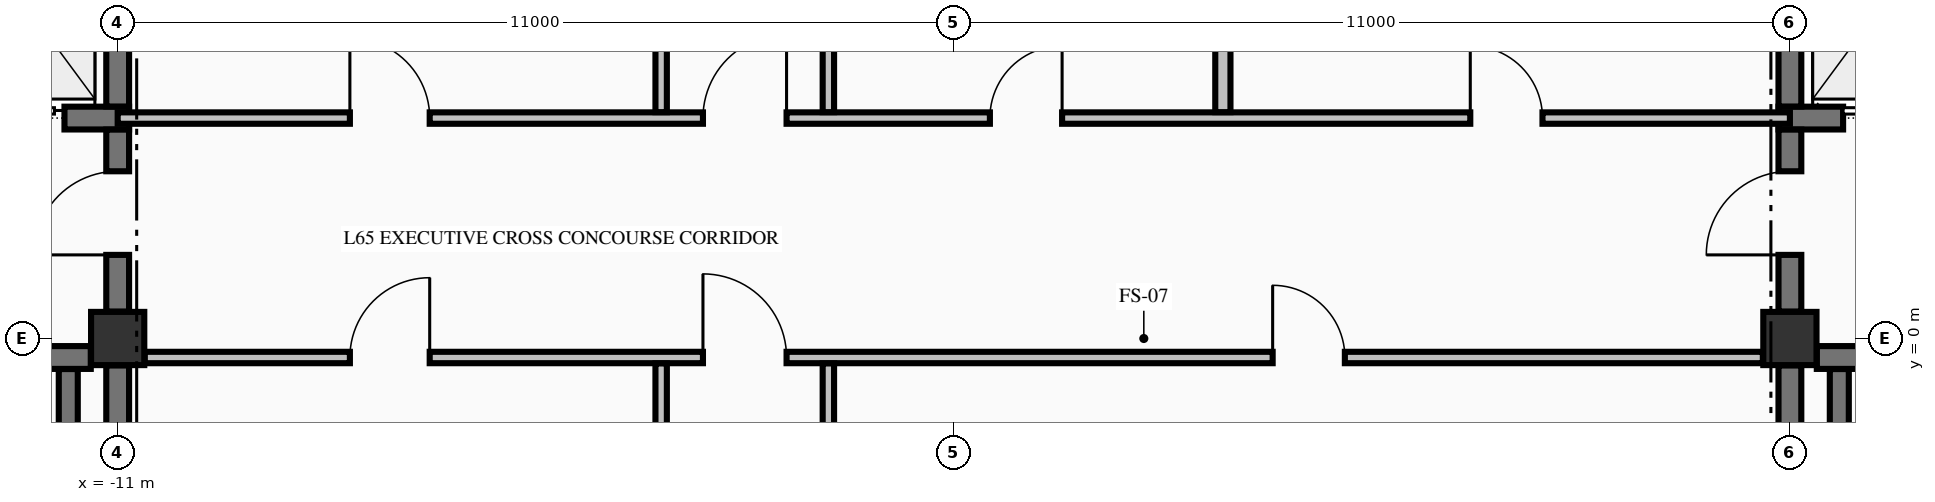
"""IFC4 building model, lengths in metres.
Left out: names, types, materials, properties, quantities, classifications, styles, units other than length and angle.
Written with IfcOpenShell. Run it as: python <this file> out.ifc"""

import sys

from ifc_helpers import new_model, si_unit, direction, frame, frame_2d, origin, origin_2d, place, context, subcontext, project, spatial, rectangle, extrude, element, fill, save


model = new_model("IFC4")
c1 = context("Model", 3, precision=1e-05, world=origin(), true_north=direction((0.0, 1.0)))
c2 = subcontext(c1, "Body", "Model", "MODEL_VIEW")
j1 = project(units=[si_unit("LENGTHUNIT", "METRE"), si_unit("PLANEANGLEUNIT", "RADIAN")], contexts=[c1])
p1 = place(None, origin())
s1 = spatial("IfcSite", under=j1, at=p1, CompositionType="ELEMENT")
p2 = place(p1, origin())
s2 = spatial("IfcBuilding", under=s1, at=p2, CompositionType="ELEMENT")
p3 = place(p2, frame((0.0, 0.0, 246.2)))
s3 = spatial("IfcBuildingStorey", under=s2, at=p3, CompositionType="ELEMENT", Elevation=246.2)
for number, where, z_axis, x_axis in (
    (1, (-11.0, 0.0, -0.25), (0.0, 0.0, 1.0), (1.0, 0.0, 0.0)),
    (2, (11.0, 0.0, -0.25), (0.0, 0.0, 1.0), (1.0, 0.0, 0.0)),
):
    element("IfcColumn", number, at=place(p3, frame(where, z_axis=z_axis, x_axis=x_axis)), inside=s3, PredefinedType="COLUMN", context=c2, shape_type="SweptSolid", body=[
        extrude(rectangle(XDim=0.7, YDim=0.7, at=origin_2d()), origin(), (0.0, 0.0, 1.0), 3.055),
    ])
p4 = place(p3, frame((-20.571, -0.25, 0.0), z_axis=(0.0, 0.0, 1.0), x_axis=(1.0, 0.0, 0.0)))
e3 = element("IfcWall", 3, at=p4, inside=s3, PredefinedType="SHEAR", context=c2, shape_type="SweptSolid", body=[
    extrude(rectangle(XDim=9.217, YDim=0.3, at=frame_2d((4.608, 0.0))), origin(), (0.0, 0.0, 1.0), 2.805),
])
p5 = place(p4, frame((6.871, 0.0, 0.0)))
e4 = element("IfcOpeningElement", 4, at=p5, cuts=e3, PredefinedType="OPENING", context=c2, shape_type="SweptSolid", body=[
    extrude(rectangle(XDim=1.1, YDim=2.15, at=frame_2d((0.55, 1.075))), frame((0.0, 0.16, 0.0), z_axis=(0.0, -1.0, 0.0), x_axis=(1.0, 0.0, 0.0)), (0.0, 0.0, 1.0), 0.32),
])
p6 = place(p3, frame((11.354, -0.25, 0.0), z_axis=(0.0, 0.0, 1.0), x_axis=(1.0, 0.0, 0.0)))
e5 = element("IfcWall", 5, at=p6, inside=s3, PredefinedType="SHEAR", context=c2, shape_type="SweptSolid", body=[
    extrude(rectangle(XDim=3.521, YDim=0.3, at=frame_2d((1.76, 0.0))), origin(), (0.0, 0.0, 1.0), 2.805),
])
p7 = place(p6, frame((1.246, 0.0, 0.0)))
e6 = element("IfcOpeningElement", 6, at=p7, cuts=e5, PredefinedType="OPENING", context=c2, shape_type="SweptSolid", body=[
    extrude(rectangle(XDim=1.1, YDim=2.15, at=frame_2d((0.55, 1.075))), frame((0.0, 0.16, 0.0), z_axis=(0.0, -1.0, 0.0), x_axis=(1.0, 0.0, 0.0)), (0.0, 0.0, 1.0), 0.32),
])
p8 = place(p3, frame((-14.875, 2.9, 0.0), z_axis=(0.0, 0.0, 1.0), x_axis=(1.0, 0.0, 0.0)))
e7 = element("IfcWall", 7, at=p8, inside=s3, PredefinedType="SHEAR", context=c2, shape_type="SweptSolid", body=[
    extrude(rectangle(XDim=4.025, YDim=0.3, at=frame_2d((2.012, 0.0))), origin(), (0.0, 0.0, 1.0), 2.805),
])
p9 = place(p8, frame((2.075, 0.0, 0.0)))
e8 = element("IfcOpeningElement", 8, at=p9, cuts=e7, PredefinedType="OPENING", context=c2, shape_type="SweptSolid", body=[
    extrude(rectangle(XDim=1.1, YDim=2.2, at=frame_2d((0.55, 1.1))), frame((0.0, 0.16, 0.0), z_axis=(0.0, -1.0, 0.0), x_axis=(1.0, 0.0, 0.0)), (0.0, 0.0, 1.0), 0.32),
])
p10 = place(p3, frame((10.85, 2.9, 0.0), z_axis=(0.0, 0.0, 1.0), x_axis=(1.0, 0.0, 0.0)))
e9 = element("IfcWall", 9, at=p10, inside=s3, PredefinedType="SHEAR", context=c2, shape_type="SweptSolid", body=[
    extrude(rectangle(XDim=4.025, YDim=0.3, at=frame_2d((2.012, 0.0))), origin(), (0.0, 0.0, 1.0), 2.805),
])
p11 = place(p10, frame((0.85, 0.0, 0.0)))
e10 = element("IfcOpeningElement", 10, at=p11, cuts=e9, PredefinedType="OPENING", context=c2, shape_type="SweptSolid", body=[
    extrude(rectangle(XDim=1.1, YDim=2.2, at=frame_2d((0.55, 1.1))), frame((0.0, 0.16, 0.0), z_axis=(0.0, -1.0, 0.0), x_axis=(1.0, 0.0, 0.0)), (0.0, 0.0, 1.0), 0.32),
])
p12 = place(p3, frame((-10.644, -0.25, 0.0), z_axis=(0.0, 0.0, 1.0), x_axis=(1.0, 0.0, 0.0)))
e11 = element("IfcWall", 11, at=p12, inside=s3, PredefinedType="PARTITIONING", context=c2, shape_type="SweptSolid", body=[
    extrude(rectangle(XDim=21.288, YDim=0.15, at=frame_2d((10.644, 0.0))), origin(), (0.0, 0.0, 1.0), 2.805),
])
p13 = place(p12, frame((7.344, 0.0, 0.0)))
e12 = element("IfcOpeningElement", 12, at=p13, cuts=e11, PredefinedType="OPENING", context=c2, shape_type="SweptSolid", body=[
    extrude(rectangle(XDim=1.1, YDim=2.15, at=frame_2d((0.55, 1.075))), frame((0.0, 0.085, 0.0), z_axis=(0.0, -1.0, 0.0), x_axis=(1.0, 0.0, 0.0)), (0.0, 0.0, 1.0), 0.17),
])
p14 = place(p12, frame((2.699, 0.0, 0.0)))
e13 = element("IfcOpeningElement", 13, at=p14, cuts=e11, PredefinedType="OPENING", context=c2, shape_type="SweptSolid", body=[
    extrude(rectangle(XDim=1.05, YDim=2.15, at=frame_2d((0.525, 1.075))), frame((0.0, 0.085, 0.0), z_axis=(0.0, -1.0, 0.0), x_axis=(1.0, 0.0, 0.0)), (0.0, 0.0, 1.0), 0.17),
])
p15 = place(p12, frame((14.839, 0.0, 0.0)))
e14 = element("IfcOpeningElement", 14, at=p15, cuts=e11, PredefinedType="OPENING", context=c2, shape_type="SweptSolid", body=[
    extrude(rectangle(XDim=0.95, YDim=2.15, at=frame_2d((0.475, 1.075))), frame((0.0, 0.085, 0.0), z_axis=(0.0, -1.0, 0.0), x_axis=(1.0, 0.0, 0.0)), (0.0, 0.0, 1.0), 0.17),
])
p16 = place(p3, frame((-11.0, 2.9, 0.0), z_axis=(0.0, 0.0, 1.0), x_axis=(1.0, 0.0, 0.0)))
e15 = element("IfcWall", 15, at=p16, inside=s3, PredefinedType="PARTITIONING", context=c2, shape_type="SweptSolid", body=[
    extrude(rectangle(XDim=22.0, YDim=0.15, at=frame_2d((11.0, 0.0))), origin(), (0.0, 0.0, 1.0), 2.805),
])
p17 = place(p16, frame((7.7, 0.0, 0.0)))
e16 = element("IfcOpeningElement", 16, at=p17, cuts=e15, PredefinedType="OPENING", context=c2, shape_type="SweptSolid", body=[
    extrude(rectangle(XDim=1.1, YDim=2.15, at=frame_2d((0.55, 1.075))), frame((0.0, 0.085, 0.0), z_axis=(0.0, -1.0, 0.0), x_axis=(1.0, 0.0, 0.0)), (0.0, 0.0, 1.0), 0.17),
])
p18 = place(p16, frame((3.055, 0.0, 0.0)))
e17 = element("IfcOpeningElement", 17, at=p18, cuts=e15, PredefinedType="OPENING", context=c2, shape_type="SweptSolid", body=[
    extrude(rectangle(XDim=1.05, YDim=2.15, at=frame_2d((0.525, 1.075))), frame((0.0, 0.085, 0.0), z_axis=(0.0, -1.0, 0.0), x_axis=(1.0, 0.0, 0.0)), (0.0, 0.0, 1.0), 0.17),
])
p19 = place(p16, frame((11.475, 0.0, 0.0)))
e18 = element("IfcOpeningElement", 18, at=p19, cuts=e15, PredefinedType="OPENING", context=c2, shape_type="SweptSolid", body=[
    extrude(rectangle(XDim=0.95, YDim=2.15, at=frame_2d((0.475, 1.075))), frame((0.0, 0.085, 0.0), z_axis=(0.0, -1.0, 0.0), x_axis=(1.0, 0.0, 0.0)), (0.0, 0.0, 1.0), 0.17),
])
p20 = place(p16, frame((17.795, 0.0, 0.0)))
e19 = element("IfcOpeningElement", 19, at=p20, cuts=e15, PredefinedType="OPENING", context=c2, shape_type="SweptSolid", body=[
    extrude(rectangle(XDim=0.95, YDim=2.15, at=frame_2d((0.475, 1.075))), frame((0.0, 0.085, 0.0), z_axis=(0.0, -1.0, 0.0), x_axis=(1.0, 0.0, 0.0)), (0.0, 0.0, 1.0), 0.17),
])
p21 = place(p3, frame((-11.65, -9.798, 0.0), z_axis=(0.0, 0.0, 1.0), x_axis=(0.0, 1.0, 0.0)))
e20 = element("IfcWall", 20, at=p21, inside=s3, PredefinedType="SOLIDWALL", context=c2, shape_type="SweptSolid", body=[
    extrude(rectangle(XDim=9.396, YDim=0.25, at=frame_2d((4.698, 0.0))), origin(), (0.0, 0.0, 1.0), 2.805),
])
p22 = place(p3, frame((-11.0, -9.596, 0.0), z_axis=(0.0, 0.0, 1.0), x_axis=(0.0, 1.0, 0.0)))
e21 = element("IfcWall", 21, at=p22, inside=s3, PredefinedType="SHEAR", context=c2, shape_type="SweptSolid", body=[
    extrude(rectangle(XDim=9.242, YDim=0.3, at=frame_2d((4.621, 0.0))), origin(), (0.0, 0.0, 1.0), 2.805),
])
p23 = place(p3, frame((-11.0, 0.354, 0.0), z_axis=(0.0, 0.0, 1.0), x_axis=(0.0, 1.0, 0.0)))
e22 = element("IfcWall", 22, at=p23, inside=s3, PredefinedType="SHEAR", context=c2, shape_type="SweptSolid", body=[
    extrude(rectangle(XDim=2.394, YDim=0.3, at=frame_2d((1.197, 0.0))), origin(), (0.0, 0.0, 1.0), 2.805),
])
p24 = place(p23, frame((0.746, 0.0, 0.0)))
e23 = element("IfcOpeningElement", 23, at=p24, cuts=e22, PredefinedType="OPENING", context=c2, shape_type="SweptSolid", body=[
    extrude(rectangle(XDim=1.1, YDim=2.15, at=frame_2d((0.55, 1.075))), frame((0.0, 0.16, 0.0), z_axis=(0.0, -1.0, 0.0), x_axis=(1.0, 0.0, 0.0)), (0.0, 0.0, 1.0), 0.32),
])
p25 = place(p3, frame((-11.0, 3.052, 0.0), z_axis=(0.0, 0.0, 1.0), x_axis=(0.0, 1.0, 0.0)))
e24 = element("IfcWall", 24, at=p25, inside=s3, PredefinedType="SHEAR", context=c2, shape_type="SweptSolid", body=[
    extrude(rectangle(XDim=2.496, YDim=0.3, at=frame_2d((1.248, 0.0))), origin(), (0.0, 0.0, 1.0), 2.805),
])
p26 = place(p3, frame((11.0, -9.596, 0.0), z_axis=(0.0, 0.0, 1.0), x_axis=(0.0, 1.0, 0.0)))
e25 = element("IfcWall", 25, at=p26, inside=s3, PredefinedType="SHEAR", context=c2, shape_type="SweptSolid", body=[
    extrude(rectangle(XDim=9.242, YDim=0.3, at=frame_2d((4.621, 0.0))), origin(), (0.0, 0.0, 1.0), 2.805),
])
p27 = place(p3, frame((11.0, 0.354, 0.0), z_axis=(0.0, 0.0, 1.0), x_axis=(0.0, 1.0, 0.0)))
e26 = element("IfcWall", 26, at=p27, inside=s3, PredefinedType="SHEAR", context=c2, shape_type="SweptSolid", body=[
    extrude(rectangle(XDim=2.394, YDim=0.3, at=frame_2d((1.197, 0.0))), origin(), (0.0, 0.0, 1.0), 2.805),
])
p28 = place(p27, frame((0.746, 0.0, 0.0)))
e27 = element("IfcOpeningElement", 27, at=p28, cuts=e26, PredefinedType="OPENING", context=c2, shape_type="SweptSolid", body=[
    extrude(rectangle(XDim=1.1, YDim=2.15, at=frame_2d((0.55, 1.075))), frame((0.0, 0.16, 0.0), z_axis=(0.0, -1.0, 0.0), x_axis=(1.0, 0.0, 0.0)), (0.0, 0.0, 1.0), 0.32),
])
p29 = place(p3, frame((11.0, 3.052, 0.0), z_axis=(0.0, 0.0, 1.0), x_axis=(0.0, 1.0, 0.0)))
e28 = element("IfcWall", 28, at=p29, inside=s3, PredefinedType="SHEAR", context=c2, shape_type="SweptSolid", body=[
    extrude(rectangle(XDim=2.496, YDim=0.3, at=frame_2d((1.248, 0.0))), origin(), (0.0, 0.0, 1.0), 2.805),
])
p30 = place(p3, frame((11.65, -9.798, 0.0), z_axis=(0.0, 0.0, 1.0), x_axis=(0.0, 1.0, 0.0)))
e29 = element("IfcWall", 29, at=p30, inside=s3, PredefinedType="SOLIDWALL", context=c2, shape_type="SweptSolid", body=[
    extrude(rectangle(XDim=9.396, YDim=0.25, at=frame_2d((4.698, 0.0))), origin(), (0.0, 0.0, 1.0), 2.805),
])
p31 = place(p3, frame((-3.85, -9.872, 0.0), z_axis=(0.0, 0.0, 1.0), x_axis=(0.0, 1.0, 0.0)))
e30 = element("IfcWall", 30, at=p31, inside=s3, PredefinedType="PARTITIONING", context=c2, shape_type="SweptSolid", body=[
    extrude(rectangle(XDim=9.544, YDim=0.15, at=frame_2d((4.772, 0.0))), origin(), (0.0, 0.0, 1.0), 2.805),
])
p32 = place(p3, frame((-3.85, 2.978, 0.0), z_axis=(0.0, 0.0, 1.0), x_axis=(0.0, 1.0, 0.0)))
e31 = element("IfcWall", 31, at=p32, inside=s3, PredefinedType="PARTITIONING", context=c2, shape_type="SweptSolid", body=[
    extrude(rectangle(XDim=7.444, YDim=0.15, at=frame_2d((3.722, 0.0))), origin(), (0.0, 0.0, 1.0), 2.805),
])
p33 = place(p3, frame((-1.65, -5.247, 0.0), z_axis=(0.0, 0.0, 1.0), x_axis=(0.0, 1.0, 0.0)))
e32 = element("IfcWall", 32, at=p33, inside=s3, PredefinedType="PARTITIONING", context=c2, shape_type="SweptSolid", body=[
    extrude(rectangle(XDim=4.919, YDim=0.15, at=frame_2d((2.459, 0.0))), origin(), (0.0, 0.0, 1.0), 2.805),
])
p34 = place(p3, frame((-1.65, 2.978, 0.0), z_axis=(0.0, 0.0, 1.0), x_axis=(0.0, 1.0, 0.0)))
e33 = element("IfcWall", 33, at=p34, inside=s3, PredefinedType="PARTITIONING", context=c2, shape_type="SweptSolid", body=[
    extrude(rectangle(XDim=7.444, YDim=0.15, at=frame_2d((3.722, 0.0))), origin(), (0.0, 0.0, 1.0), 2.805),
])
p35 = place(p3, frame((3.54, 2.978, 0.0), z_axis=(0.0, 0.0, 1.0), x_axis=(0.0, 1.0, 0.0)))
e34 = element("IfcWall", 34, at=p35, inside=s3, PredefinedType="PARTITIONING", context=c2, shape_type="SweptSolid", body=[
    extrude(rectangle(XDim=7.444, YDim=0.2, at=frame_2d((3.722, 0.0))), origin(), (0.0, 0.0, 1.0), 2.805),
])
p36 = place(p24, origin())
e35 = element("IfcDoor", 35, at=p36, inside=s3, OperationType="SINGLE_SWING_LEFT", PredefinedType="DOOR", context=c2, shape_type="SweptSolid", body=[
    extrude(rectangle(XDim=1.1, YDim=2.15, at=frame_2d((0.55, 1.075))), frame((0.0, 0.025, 0.0), z_axis=(0.0, -1.0, 0.0), x_axis=(1.0, 0.0, 0.0)), (0.0, 0.0, 1.0), 0.05),
])
fill(e23, e35)
p37 = place(p9, origin())
e36 = element("IfcDoor", 36, at=p37, inside=s3, OperationType="SLIDING_TO_LEFT", PredefinedType="DOOR", context=c2, shape_type="SweptSolid", body=[
    extrude(rectangle(XDim=1.1, YDim=2.2, at=frame_2d((0.55, 1.1))), frame((0.0, 0.025, 0.0), z_axis=(0.0, -1.0, 0.0), x_axis=(1.0, 0.0, 0.0)), (0.0, 0.0, 1.0), 0.05),
])
fill(e8, e36)
p38 = place(p28, origin())
e37 = element("IfcDoor", 37, at=p38, inside=s3, OperationType="SINGLE_SWING_LEFT", PredefinedType="DOOR", context=c2, shape_type="SweptSolid", body=[
    extrude(rectangle(XDim=1.1, YDim=2.15, at=frame_2d((0.55, 1.075))), frame((0.0, 0.025, 0.0), z_axis=(0.0, -1.0, 0.0), x_axis=(1.0, 0.0, 0.0)), (0.0, 0.0, 1.0), 0.05),
])
fill(e27, e37)
p39 = place(p11, origin())
e38 = element("IfcDoor", 38, at=p39, inside=s3, OperationType="SLIDING_TO_RIGHT", PredefinedType="DOOR", context=c2, shape_type="SweptSolid", body=[
    extrude(rectangle(XDim=1.1, YDim=2.2, at=frame_2d((0.55, 1.1))), frame((0.0, 0.025, 0.0), z_axis=(0.0, -1.0, 0.0), x_axis=(1.0, 0.0, 0.0)), (0.0, 0.0, 1.0), 0.05),
])
fill(e10, e38)
p40 = place(p17, origin())
e39 = element("IfcDoor", 39, at=p40, inside=s3, OperationType="SINGLE_SWING_RIGHT", PredefinedType="DOOR", context=c2, shape_type="SweptSolid", body=[
    extrude(rectangle(XDim=1.1, YDim=2.15, at=frame_2d((0.55, 1.075))), frame((0.0, 0.025, 0.0), z_axis=(0.0, -1.0, 0.0), x_axis=(1.0, 0.0, 0.0)), (0.0, 0.0, 1.0), 0.05),
])
fill(e16, e39)
p41 = place(p13, origin())
e40 = element("IfcDoor", 40, at=p41, inside=s3, OperationType="SINGLE_SWING_LEFT", PredefinedType="DOOR", context=c2, shape_type="SweptSolid", body=[
    extrude(rectangle(XDim=1.1, YDim=2.15, at=frame_2d((0.55, 1.075))), frame((0.0, 0.025, 0.0), z_axis=(0.0, -1.0, 0.0), x_axis=(1.0, 0.0, 0.0)), (0.0, 0.0, 1.0), 0.05),
])
fill(e12, e40)
p42 = place(p18, origin())
e41 = element("IfcDoor", 41, at=p42, inside=s3, OperationType="SINGLE_SWING_LEFT", PredefinedType="DOOR", context=c2, shape_type="SweptSolid", body=[
    extrude(rectangle(XDim=1.05, YDim=2.15, at=frame_2d((0.525, 1.075))), frame((0.0, 0.025, 0.0), z_axis=(0.0, -1.0, 0.0), x_axis=(1.0, 0.0, 0.0)), (0.0, 0.0, 1.0), 0.05),
])
fill(e17, e41)
p43 = place(p19, origin())
e42 = element("IfcDoor", 42, at=p43, inside=s3, OperationType="SINGLE_SWING_RIGHT", PredefinedType="DOOR", context=c2, shape_type="SweptSolid", body=[
    extrude(rectangle(XDim=0.95, YDim=2.15, at=frame_2d((0.475, 1.075))), frame((0.0, 0.025, 0.0), z_axis=(0.0, -1.0, 0.0), x_axis=(1.0, 0.0, 0.0)), (0.0, 0.0, 1.0), 0.05),
])
fill(e18, e42)
p44 = place(p20, origin())
e43 = element("IfcDoor", 43, at=p44, inside=s3, OperationType="SINGLE_SWING_LEFT", PredefinedType="DOOR", context=c2, shape_type="SweptSolid", body=[
    extrude(rectangle(XDim=0.95, YDim=2.15, at=frame_2d((0.475, 1.075))), frame((0.0, 0.025, 0.0), z_axis=(0.0, -1.0, 0.0), x_axis=(1.0, 0.0, 0.0)), (0.0, 0.0, 1.0), 0.05),
])
fill(e19, e43)
p45 = place(p14, origin())
e44 = element("IfcDoor", 44, at=p45, inside=s3, OperationType="SINGLE_SWING_RIGHT", PredefinedType="DOOR", context=c2, shape_type="SweptSolid", body=[
    extrude(rectangle(XDim=1.05, YDim=2.15, at=frame_2d((0.525, 1.075))), frame((0.0, 0.025, 0.0), z_axis=(0.0, -1.0, 0.0), x_axis=(1.0, 0.0, 0.0)), (0.0, 0.0, 1.0), 0.05),
])
fill(e13, e44)
p46 = place(p15, origin())
e45 = element("IfcDoor", 45, at=p46, inside=s3, OperationType="SINGLE_SWING_LEFT", PredefinedType="DOOR", context=c2, shape_type="SweptSolid", body=[
    extrude(rectangle(XDim=0.95, YDim=2.15, at=frame_2d((0.475, 1.075))), frame((0.0, 0.025, 0.0), z_axis=(0.0, -1.0, 0.0), x_axis=(1.0, 0.0, 0.0)), (0.0, 0.0, 1.0), 0.05),
])
fill(e14, e45)
save(model, sys.argv[1])
